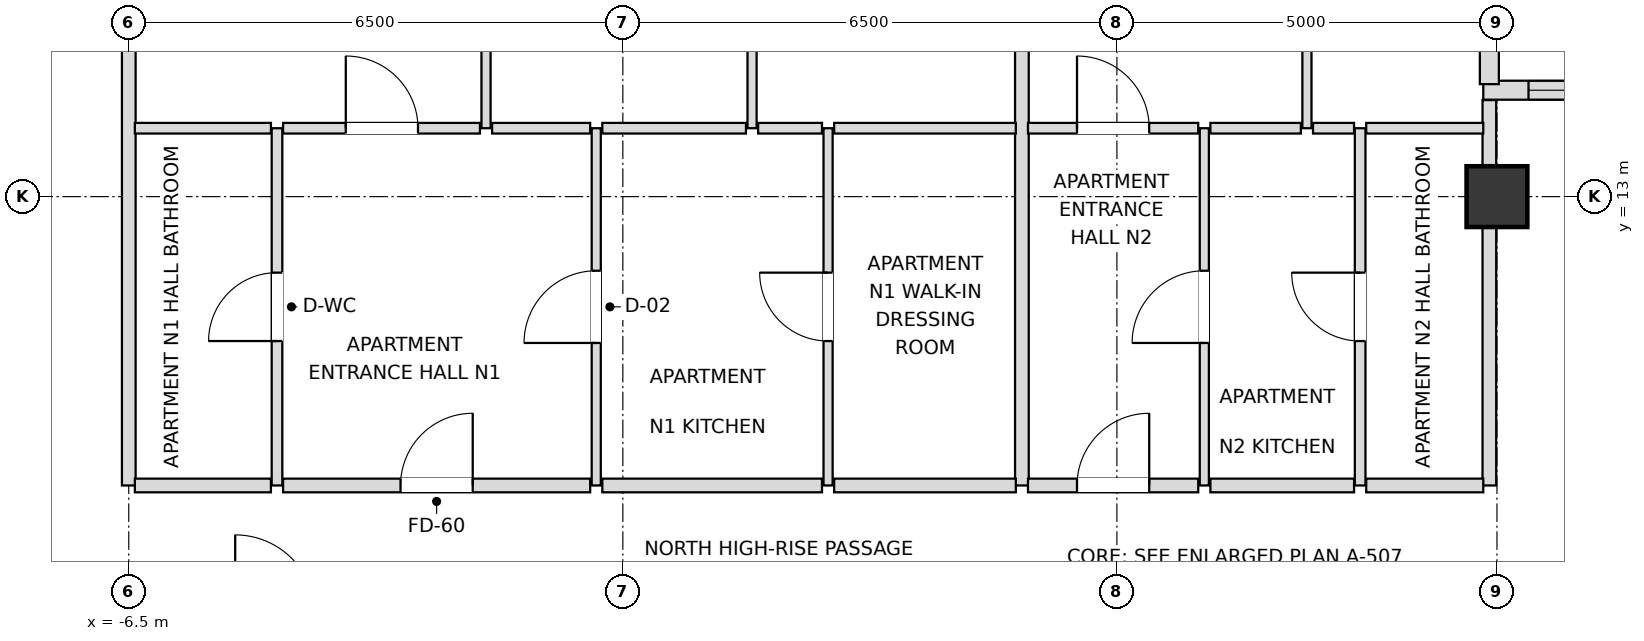
"""IFC4 building model, lengths in metres.
Left out: names, types, materials, properties, quantities, classifications, styles, units other than length and angle.
Written with IfcOpenShell. Run it as: python <this file> out.ifc"""

import sys

from ifc_helpers import new_model, si_unit, direction, frame, frame_2d, origin, origin_2d, place, context, subcontext, project, spatial, rectangle, extrude, element, fill, save


model = new_model("IFC4")
c1 = context("Model", 3, precision=1e-05, world=origin(), true_north=direction((0.0, 1.0)))
c2 = subcontext(c1, "Body", "Model", "MODEL_VIEW")
j1 = project(units=[si_unit("LENGTHUNIT", "METRE"), si_unit("PLANEANGLEUNIT", "RADIAN")], contexts=[c1])
p1 = place(None, origin())
s1 = spatial("IfcSite", under=j1, at=p1, CompositionType="ELEMENT")
p2 = place(p1, origin())
s2 = spatial("IfcBuilding", under=s1, at=p2, CompositionType="ELEMENT")
p3 = place(p2, frame((0.0, 0.0, 225.9)))
s3 = spatial("IfcBuildingStorey", under=s2, at=p3, CompositionType="ELEMENT", Elevation=225.9)
p4 = place(p3, frame((11.5, 13.0, 0.0), z_axis=(0.0, 0.0, 1.0), x_axis=(1.0, 0.0, 0.0)))
e1 = element("IfcColumn", 1, at=p4, inside=s3, PredefinedType="COLUMN", context=c2, shape_type="SweptSolid", body=[
    extrude(rectangle(XDim=0.8, YDim=0.8, at=origin_2d()), origin(), (0.0, 0.0, 1.0), 3.6),
])
p5 = place(p3, frame((16.98, 14.4, 0.0), z_axis=(0.0, 0.0, 1.0), x_axis=(-1.0, 0.0, 0.0)))
e2 = element("IfcWall", 2, at=p5, inside=s3, PredefinedType="SOLIDWALL", context=c2, shape_type="SweptSolid", body=[
    extrude(rectangle(XDim=5.66, YDim=0.25, at=frame_2d((2.83, 0.0))), origin(), (0.0, 0.0, 1.0), 2.748),
])
p6 = place(p5, frame((0.595, 0.0, 0.72)))
e3 = element("IfcOpeningElement", 3, at=p6, cuts=e2, PredefinedType="OPENING", context=c2, shape_type="SweptSolid", body=[
    extrude(rectangle(XDim=1.8, YDim=1.68, at=frame_2d((0.9, 0.84))), frame((0.0, 0.135, 0.0), z_axis=(0.0, -1.0, 0.0), x_axis=(1.0, 0.0, 0.0)), (0.0, 0.0, 1.0), 0.27),
])
p7 = place(p5, frame((3.265, 0.0, 0.72)))
e4 = element("IfcOpeningElement", 4, at=p7, cuts=e2, PredefinedType="OPENING", context=c2, shape_type="SweptSolid", body=[
    extrude(rectangle(XDim=1.8, YDim=1.68, at=frame_2d((0.9, 0.84))), frame((0.0, 0.135, 0.0), z_axis=(0.0, -1.0, 0.0), x_axis=(1.0, 0.0, 0.0)), (0.0, 0.0, 1.0), 0.27),
])
p8 = place(p3, frame((11.4, 14.48, 0.0), z_axis=(0.0, 0.0, 1.0), x_axis=(0.0, 1.0, 0.0)))
e5 = element("IfcWall", 5, at=p8, inside=s3, PredefinedType="SOLIDWALL", context=c2, shape_type="SweptSolid", body=[
    extrude(rectangle(XDim=5.34, YDim=0.25, at=frame_2d((2.67, 0.0))), origin(), (0.0, 0.0, 1.0), 2.748),
])
p9 = place(p8, frame((1.615, 0.0, 0.72)))
e6 = element("IfcOpeningElement", 6, at=p9, cuts=e5, PredefinedType="OPENING", context=c2, shape_type="SweptSolid", body=[
    extrude(rectangle(XDim=1.8, YDim=1.68, at=frame_2d((0.9, 0.84))), frame((0.0, 0.135, 0.0), z_axis=(0.0, -1.0, 0.0), x_axis=(1.0, 0.0, 0.0)), (0.0, 0.0, 1.0), 0.27),
])
p10 = place(p3, frame((-6.5, 9.2, 0.0), z_axis=(0.0, 0.0, 1.0), x_axis=(0.0, 1.0, 0.0)))
e7 = element("IfcWall", 7, at=p10, inside=s3, PredefinedType="PARTITIONING", context=c2, shape_type="SweptSolid", body=[
    extrude(rectangle(XDim=10.7, YDim=0.18, at=frame_2d((5.35, 0.0))), origin(), (0.0, 0.0, 1.0), 2.826),
])
p11 = place(p3, frame((-4.55, 9.2, 0.0), z_axis=(0.0, 0.0, 1.0), x_axis=(0.0, 1.0, 0.0)))
e8 = element("IfcWall", 8, at=p11, inside=s3, PredefinedType="PARTITIONING", context=c2, shape_type="SweptSolid", body=[
    extrude(rectangle(XDim=4.7, YDim=0.14, at=frame_2d((2.35, 0.0))), origin(), (0.0, 0.0, 1.0), 3.38),
])
p12 = place(p11, frame((1.9, 0.0, 0.0)))
e9 = element("IfcOpeningElement", 9, at=p12, cuts=e8, PredefinedType="OPENING", context=c2, shape_type="SweptSolid", body=[
    extrude(rectangle(XDim=0.9, YDim=2.1, at=frame_2d((0.45, 1.05))), frame((0.0, 0.08, 0.0), z_axis=(0.0, -1.0, 0.0), x_axis=(1.0, 0.0, 0.0)), (0.0, 0.0, 1.0), 0.16),
])
p13 = place(p3, frame((-1.8, 13.9, 0.0), z_axis=(0.0, 0.0, 1.0), x_axis=(0.0, 1.0, 0.0)))
e10 = element("IfcWall", 10, at=p13, inside=s3, PredefinedType="PARTITIONING", context=c2, shape_type="SweptSolid", body=[
    extrude(rectangle(XDim=6.0, YDim=0.12, at=frame_2d((3.0, 0.0))), origin(), (0.0, 0.0, 1.0), 3.018),
])
p14 = place(p13, frame((2.55, 0.0, 0.0)))
e11 = element("IfcOpeningElement", 11, at=p14, cuts=e10, PredefinedType="OPENING", context=c2, shape_type="SweptSolid", body=[
    extrude(rectangle(XDim=0.9, YDim=2.1, at=frame_2d((0.45, 1.05))), frame((0.0, 0.07, 0.0), z_axis=(0.0, -1.0, 0.0), x_axis=(1.0, 0.0, 0.0)), (0.0, 0.0, 1.0), 0.14),
])
p15 = place(p3, frame((-0.35, 9.2, 0.0), z_axis=(0.0, 0.0, 1.0), x_axis=(0.0, 1.0, 0.0)))
e12 = element("IfcWall", 12, at=p15, inside=s3, PredefinedType="PARTITIONING", context=c2, shape_type="SweptSolid", body=[
    extrude(rectangle(XDim=4.7, YDim=0.12, at=frame_2d((2.35, 0.0))), origin(), (0.0, 0.0, 1.0), 3.38),
])
p16 = place(p15, frame((1.875, 0.0, 0.0)))
e13 = element("IfcOpeningElement", 13, at=p16, cuts=e12, PredefinedType="OPENING", context=c2, shape_type="SweptSolid", body=[
    extrude(rectangle(XDim=0.95, YDim=2.1, at=frame_2d((0.475, 1.05))), frame((0.0, 0.07, 0.0), z_axis=(0.0, -1.0, 0.0), x_axis=(1.0, 0.0, 0.0)), (0.0, 0.0, 1.0), 0.14),
])
p17 = place(p3, frame((1.7, 13.9, 0.0), z_axis=(0.0, 0.0, 1.0), x_axis=(0.0, 1.0, 0.0)))
e14 = element("IfcWall", 14, at=p17, inside=s3, PredefinedType="PARTITIONING", context=c2, shape_type="SweptSolid", body=[
    extrude(rectangle(XDim=6.0, YDim=0.12, at=frame_2d((3.0, 0.0))), origin(), (0.0, 0.0, 1.0), 3.018),
])
p18 = place(p17, frame((2.55, 0.0, 0.0)))
e15 = element("IfcOpeningElement", 15, at=p18, cuts=e14, PredefinedType="OPENING", context=c2, shape_type="SweptSolid", body=[
    extrude(rectangle(XDim=0.9, YDim=2.1, at=frame_2d((0.45, 1.05))), frame((0.0, 0.07, 0.0), z_axis=(0.0, -1.0, 0.0), x_axis=(1.0, 0.0, 0.0)), (0.0, 0.0, 1.0), 0.14),
])
p19 = place(p3, frame((2.7, 9.2, 0.0), z_axis=(0.0, 0.0, 1.0), x_axis=(0.0, 1.0, 0.0)))
e16 = element("IfcWall", 16, at=p19, inside=s3, PredefinedType="PARTITIONING", context=c2, shape_type="SweptSolid", body=[
    extrude(rectangle(XDim=4.7, YDim=0.12, at=frame_2d((2.35, 0.0))), origin(), (0.0, 0.0, 1.0), 3.38),
])
p20 = place(p19, frame((1.9, 0.0, 0.0)))
e17 = element("IfcOpeningElement", 17, at=p20, cuts=e16, PredefinedType="OPENING", context=c2, shape_type="SweptSolid", body=[
    extrude(rectangle(XDim=0.9, YDim=2.1, at=frame_2d((0.45, 1.05))), frame((0.0, 0.07, 0.0), z_axis=(0.0, -1.0, 0.0), x_axis=(1.0, 0.0, 0.0)), (0.0, 0.0, 1.0), 0.14),
])
p21 = place(p3, frame((5.25, 9.2, 0.0), z_axis=(0.0, 0.0, 1.0), x_axis=(0.0, 1.0, 0.0)))
e18 = element("IfcWall", 18, at=p21, inside=s3, PredefinedType="PARTITIONING", context=c2, shape_type="SweptSolid", body=[
    extrude(rectangle(XDim=10.7, YDim=0.18, at=frame_2d((5.35, 0.0))), origin(), (0.0, 0.0, 1.0), 3.018),
])
p22 = place(p3, frame((7.65, 9.2, 0.0), z_axis=(0.0, 0.0, 1.0), x_axis=(0.0, 1.0, 0.0)))
e19 = element("IfcWall", 19, at=p22, inside=s3, PredefinedType="PARTITIONING", context=c2, shape_type="SweptSolid", body=[
    extrude(rectangle(XDim=4.7, YDim=0.12, at=frame_2d((2.35, 0.0))), origin(), (0.0, 0.0, 1.0), 2.826),
])
p23 = place(p22, frame((1.875, 0.0, 0.0)))
e20 = element("IfcOpeningElement", 20, at=p23, cuts=e19, PredefinedType="OPENING", context=c2, shape_type="SweptSolid", body=[
    extrude(rectangle(XDim=0.95, YDim=2.1, at=frame_2d((0.475, 1.05))), frame((0.0, 0.07, 0.0), z_axis=(0.0, -1.0, 0.0), x_axis=(1.0, 0.0, 0.0)), (0.0, 0.0, 1.0), 0.14),
])
p24 = place(p3, frame((9.0, 13.9, 0.0), z_axis=(0.0, 0.0, 1.0), x_axis=(0.0, 1.0, 0.0)))
e21 = element("IfcWall", 21, at=p24, inside=s3, PredefinedType="PARTITIONING", context=c2, shape_type="SweptSolid", body=[
    extrude(rectangle(XDim=6.0, YDim=0.12, at=frame_2d((3.0, 0.0))), origin(), (0.0, 0.0, 1.0), 3.38),
])
p25 = place(p24, frame((2.55, 0.0, 0.0)))
e22 = element("IfcOpeningElement", 22, at=p25, cuts=e21, PredefinedType="OPENING", context=c2, shape_type="SweptSolid", body=[
    extrude(rectangle(XDim=0.9, YDim=2.1, at=frame_2d((0.45, 1.05))), frame((0.0, 0.07, 0.0), z_axis=(0.0, -1.0, 0.0), x_axis=(1.0, 0.0, 0.0)), (0.0, 0.0, 1.0), 0.14),
])
p26 = place(p3, frame((9.7, 9.2, 0.0), z_axis=(0.0, 0.0, 1.0), x_axis=(0.0, 1.0, 0.0)))
e23 = element("IfcWall", 23, at=p26, inside=s3, PredefinedType="PARTITIONING", context=c2, shape_type="SweptSolid", body=[
    extrude(rectangle(XDim=4.7, YDim=0.14, at=frame_2d((2.35, 0.0))), origin(), (0.0, 0.0, 1.0), 2.826),
])
p27 = place(p26, frame((1.9, 0.0, 0.0)))
e24 = element("IfcOpeningElement", 24, at=p27, cuts=e23, PredefinedType="OPENING", context=c2, shape_type="SweptSolid", body=[
    extrude(rectangle(XDim=0.9, YDim=2.1, at=frame_2d((0.45, 1.05))), frame((0.0, 0.08, 0.0), z_axis=(0.0, -1.0, 0.0), x_axis=(1.0, 0.0, 0.0)), (0.0, 0.0, 1.0), 0.16),
])
p28 = place(p3, frame((11.4, 9.2, 0.0), z_axis=(0.0, 0.0, 1.0), x_axis=(0.0, 1.0, 0.0)))
e25 = element("IfcWall", 25, at=p28, inside=s3, PredefinedType="PARTITIONING", context=c2, shape_type="SweptSolid", body=[
    extrude(rectangle(XDim=5.07, YDim=0.18, at=frame_2d((2.535, 0.0))), origin(), (0.0, 0.0, 1.0), 2.748),
])
p29 = place(p3, frame((-6.42, 9.2, 0.0), z_axis=(0.0, 0.0, 1.0), x_axis=(1.0, 0.0, 0.0)))
e26 = element("IfcWall", 26, at=p29, inside=s3, PredefinedType="PARTITIONING", context=c2, shape_type="SweptSolid", body=[
    extrude(rectangle(XDim=1.79, YDim=0.18, at=frame_2d((0.895, 0.0))), origin(), (0.0, 0.0, 1.0), 3.38),
])
p30 = place(p3, frame((-4.47, 9.2, 0.0), z_axis=(0.0, 0.0, 1.0), x_axis=(1.0, 0.0, 0.0)))
e27 = element("IfcWall", 27, at=p30, inside=s3, PredefinedType="PARTITIONING", context=c2, shape_type="SweptSolid", body=[
    extrude(rectangle(XDim=4.04, YDim=0.18, at=frame_2d((2.02, 0.0))), origin(), (0.0, 0.0, 1.0), 3.38),
])
p31 = place(p30, frame((1.545, 0.0, 0.0)))
e28 = element("IfcOpeningElement", 28, at=p31, cuts=e27, PredefinedType="OPENING", context=c2, shape_type="SweptSolid", body=[
    extrude(rectangle(XDim=0.95, YDim=2.15, at=frame_2d((0.475, 1.075))), frame((0.0, 0.1, 0.0), z_axis=(0.0, -1.0, 0.0), x_axis=(1.0, 0.0, 0.0)), (0.0, 0.0, 1.0), 0.2),
])
p32 = place(p3, frame((-0.27, 9.2, 0.0), z_axis=(0.0, 0.0, 1.0), x_axis=(1.0, 0.0, 0.0)))
e29 = element("IfcWall", 29, at=p32, inside=s3, PredefinedType="PARTITIONING", context=c2, shape_type="SweptSolid", body=[
    extrude(rectangle(XDim=2.89, YDim=0.18, at=frame_2d((1.445, 0.0))), origin(), (0.0, 0.0, 1.0), 3.38),
])
p33 = place(p3, frame((2.78, 9.2, 0.0), z_axis=(0.0, 0.0, 1.0), x_axis=(1.0, 0.0, 0.0)))
e30 = element("IfcWall", 30, at=p33, inside=s3, PredefinedType="PARTITIONING", context=c2, shape_type="SweptSolid", body=[
    extrude(rectangle(XDim=2.39, YDim=0.18, at=frame_2d((1.195, 0.0))), origin(), (0.0, 0.0, 1.0), 3.38),
])
p34 = place(p3, frame((5.33, 9.2, 0.0), z_axis=(0.0, 0.0, 1.0), x_axis=(1.0, 0.0, 0.0)))
e31 = element("IfcWall", 31, at=p34, inside=s3, PredefinedType="PARTITIONING", context=c2, shape_type="SweptSolid", body=[
    extrude(rectangle(XDim=2.24, YDim=0.18, at=frame_2d((1.12, 0.0))), origin(), (0.0, 0.0, 1.0), 2.826),
])
p35 = place(p34, frame((0.645, 0.0, 0.0)))
e32 = element("IfcOpeningElement", 32, at=p35, cuts=e31, PredefinedType="OPENING", context=c2, shape_type="SweptSolid", body=[
    extrude(rectangle(XDim=0.95, YDim=2.15, at=frame_2d((0.475, 1.075))), frame((0.0, 0.1, 0.0), z_axis=(0.0, -1.0, 0.0), x_axis=(1.0, 0.0, 0.0)), (0.0, 0.0, 1.0), 0.2),
])
p36 = place(p3, frame((7.73, 9.2, 0.0), z_axis=(0.0, 0.0, 1.0), x_axis=(1.0, 0.0, 0.0)))
e33 = element("IfcWall", 33, at=p36, inside=s3, PredefinedType="PARTITIONING", context=c2, shape_type="SweptSolid", body=[
    extrude(rectangle(XDim=1.89, YDim=0.18, at=frame_2d((0.945, 0.0))), origin(), (0.0, 0.0, 1.0), 3.38),
])
p37 = place(p3, frame((9.78, 9.2, 0.0), z_axis=(0.0, 0.0, 1.0), x_axis=(1.0, 0.0, 0.0)))
e34 = element("IfcWall", 34, at=p37, inside=s3, PredefinedType="PARTITIONING", context=c2, shape_type="SweptSolid", body=[
    extrude(rectangle(XDim=1.54, YDim=0.18, at=frame_2d((0.77, 0.0))), origin(), (0.0, 0.0, 1.0), 3.38),
])
p38 = place(p3, frame((-6.42, 13.9, 0.0), z_axis=(0.0, 0.0, 1.0), x_axis=(1.0, 0.0, 0.0)))
e35 = element("IfcWall", 35, at=p38, inside=s3, PredefinedType="PARTITIONING", context=c2, shape_type="SweptSolid", body=[
    extrude(rectangle(XDim=1.79, YDim=0.14, at=frame_2d((0.895, 0.0))), origin(), (0.0, 0.0, 1.0), 3.38),
])
p39 = place(p3, frame((-4.47, 13.9, 0.0), z_axis=(0.0, 0.0, 1.0), x_axis=(1.0, 0.0, 0.0)))
e36 = element("IfcWall", 36, at=p39, inside=s3, PredefinedType="PARTITIONING", context=c2, shape_type="SweptSolid", body=[
    extrude(rectangle(XDim=2.59, YDim=0.14, at=frame_2d((1.295, 0.0))), origin(), (0.0, 0.0, 1.0), 3.38),
])
p40 = place(p39, frame((0.825, 0.0, 0.0)))
e37 = element("IfcOpeningElement", 37, at=p40, cuts=e36, PredefinedType="OPENING", context=c2, shape_type="SweptSolid", body=[
    extrude(rectangle(XDim=0.95, YDim=2.1, at=frame_2d((0.475, 1.05))), frame((0.0, 0.08, 0.0), z_axis=(0.0, -1.0, 0.0), x_axis=(1.0, 0.0, 0.0)), (0.0, 0.0, 1.0), 0.16),
])
p41 = place(p3, frame((-1.72, 13.9, 0.0), z_axis=(0.0, 0.0, 1.0), x_axis=(1.0, 0.0, 0.0)))
e38 = element("IfcWall", 38, at=p41, inside=s3, PredefinedType="PARTITIONING", context=c2, shape_type="SweptSolid", body=[
    extrude(rectangle(XDim=1.29, YDim=0.14, at=frame_2d((0.645, 0.0))), origin(), (0.0, 0.0, 1.0), 3.38),
])
p42 = place(p3, frame((-0.27, 13.9, 0.0), z_axis=(0.0, 0.0, 1.0), x_axis=(1.0, 0.0, 0.0)))
e39 = element("IfcWall", 39, at=p42, inside=s3, PredefinedType="PARTITIONING", context=c2, shape_type="SweptSolid", body=[
    extrude(rectangle(XDim=1.89, YDim=0.14, at=frame_2d((0.945, 0.0))), origin(), (0.0, 0.0, 1.0), 3.38),
])
p43 = place(p3, frame((1.78, 13.9, 0.0), z_axis=(0.0, 0.0, 1.0), x_axis=(1.0, 0.0, 0.0)))
e40 = element("IfcWall", 40, at=p43, inside=s3, PredefinedType="PARTITIONING", context=c2, shape_type="SweptSolid", body=[
    extrude(rectangle(XDim=0.84, YDim=0.14, at=frame_2d((0.42, 0.0))), origin(), (0.0, 0.0, 1.0), 3.38),
])
p44 = place(p3, frame((2.78, 13.9, 0.0), z_axis=(0.0, 0.0, 1.0), x_axis=(1.0, 0.0, 0.0)))
e41 = element("IfcWall", 41, at=p44, inside=s3, PredefinedType="PARTITIONING", context=c2, shape_type="SweptSolid", body=[
    extrude(rectangle(XDim=2.39, YDim=0.14, at=frame_2d((1.195, 0.0))), origin(), (0.0, 0.0, 1.0), 3.38),
])
p45 = place(p3, frame((5.33, 13.9, 0.0), z_axis=(0.0, 0.0, 1.0), x_axis=(1.0, 0.0, 0.0)))
e42 = element("IfcWall", 42, at=p45, inside=s3, PredefinedType="PARTITIONING", context=c2, shape_type="SweptSolid", body=[
    extrude(rectangle(XDim=2.24, YDim=0.14, at=frame_2d((1.12, 0.0))), origin(), (0.0, 0.0, 1.0), 2.826),
])
p46 = place(p45, frame((0.645, 0.0, 0.0)))
e43 = element("IfcOpeningElement", 43, at=p46, cuts=e42, PredefinedType="OPENING", context=c2, shape_type="SweptSolid", body=[
    extrude(rectangle(XDim=0.95, YDim=2.1, at=frame_2d((0.475, 1.05))), frame((0.0, 0.08, 0.0), z_axis=(0.0, -1.0, 0.0), x_axis=(1.0, 0.0, 0.0)), (0.0, 0.0, 1.0), 0.16),
])
p47 = place(p3, frame((7.73, 13.9, 0.0), z_axis=(0.0, 0.0, 1.0), x_axis=(1.0, 0.0, 0.0)))
e44 = element("IfcWall", 44, at=p47, inside=s3, PredefinedType="PARTITIONING", context=c2, shape_type="SweptSolid", body=[
    extrude(rectangle(XDim=1.19, YDim=0.14, at=frame_2d((0.595, 0.0))), origin(), (0.0, 0.0, 1.0), 3.38),
])
p48 = place(p3, frame((9.08, 13.9, 0.0), z_axis=(0.0, 0.0, 1.0), x_axis=(1.0, 0.0, 0.0)))
e45 = element("IfcWall", 45, at=p48, inside=s3, PredefinedType="PARTITIONING", context=c2, shape_type="SweptSolid", body=[
    extrude(rectangle(XDim=0.54, YDim=0.14, at=frame_2d((0.27, 0.0))), origin(), (0.0, 0.0, 1.0), 3.38),
])
p49 = place(p3, frame((9.78, 13.9, 0.0), z_axis=(0.0, 0.0, 1.0), x_axis=(1.0, 0.0, 0.0)))
e46 = element("IfcWall", 46, at=p49, inside=s3, PredefinedType="PARTITIONING", context=c2, shape_type="SweptSolid", body=[
    extrude(rectangle(XDim=1.54, YDim=0.14, at=frame_2d((0.77, 0.0))), origin(), (0.0, 0.0, 1.0), 3.38),
])
p50 = place(p7, origin())
e47 = element("IfcWindow", 47, at=p50, inside=s3, PartitioningType="SINGLE_PANEL", PredefinedType="WINDOW", context=c2, shape_type="SweptSolid", body=[
    extrude(rectangle(XDim=1.8, YDim=1.68, at=frame_2d((0.9, 0.84))), frame((0.0, 0.03, 0.0), z_axis=(0.0, -1.0, 0.0), x_axis=(1.0, 0.0, 0.0)), (0.0, 0.0, 1.0), 0.06),
])
fill(e4, e47)
p51 = place(p12, origin())
e48 = element("IfcDoor", 48, at=p51, inside=s3, OperationType="SINGLE_SWING_LEFT", PredefinedType="DOOR", context=c2, shape_type="SweptSolid", body=[
    extrude(rectangle(XDim=0.9, YDim=2.1, at=frame_2d((0.45, 1.05))), frame((0.0, 0.025, 0.0), z_axis=(0.0, -1.0, 0.0), x_axis=(1.0, 0.0, 0.0)), (0.0, 0.0, 1.0), 0.05),
])
fill(e9, e48)
p52 = place(p31, origin())
e49 = element("IfcDoor", 49, at=p52, inside=s3, OperationType="SINGLE_SWING_RIGHT", PredefinedType="DOOR", context=c2, shape_type="SweptSolid", body=[
    extrude(rectangle(XDim=0.95, YDim=2.15, at=frame_2d((0.475, 1.075))), frame((0.0, 0.025, 0.0), z_axis=(0.0, -1.0, 0.0), x_axis=(1.0, 0.0, 0.0)), (0.0, 0.0, 1.0), 0.05),
])
fill(e28, e49)
p53 = place(p16, origin())
e50 = element("IfcDoor", 50, at=p53, inside=s3, OperationType="SINGLE_SWING_LEFT", PredefinedType="DOOR", context=c2, shape_type="SweptSolid", body=[
    extrude(rectangle(XDim=0.95, YDim=2.1, at=frame_2d((0.475, 1.05))), frame((0.0, 0.025, 0.0), z_axis=(0.0, -1.0, 0.0), x_axis=(1.0, 0.0, 0.0)), (0.0, 0.0, 1.0), 0.05),
])
fill(e13, e50)
p54 = place(p20, origin())
e51 = element("IfcDoor", 51, at=p54, inside=s3, OperationType="SINGLE_SWING_RIGHT", PredefinedType="DOOR", context=c2, shape_type="SweptSolid", body=[
    extrude(rectangle(XDim=0.9, YDim=2.1, at=frame_2d((0.45, 1.05))), frame((0.0, 0.025, 0.0), z_axis=(0.0, -1.0, 0.0), x_axis=(1.0, 0.0, 0.0)), (0.0, 0.0, 1.0), 0.05),
])
fill(e17, e51)
p55 = place(p40, origin())
e52 = element("IfcDoor", 52, at=p55, inside=s3, OperationType="SINGLE_SWING_LEFT", PredefinedType="DOOR", context=c2, shape_type="SweptSolid", body=[
    extrude(rectangle(XDim=0.95, YDim=2.1, at=frame_2d((0.475, 1.05))), frame((0.0, 0.025, 0.0), z_axis=(0.0, -1.0, 0.0), x_axis=(1.0, 0.0, 0.0)), (0.0, 0.0, 1.0), 0.05),
])
fill(e37, e52)
p56 = place(p35, origin())
e53 = element("IfcDoor", 53, at=p56, inside=s3, OperationType="SINGLE_SWING_RIGHT", PredefinedType="DOOR", context=c2, shape_type="SweptSolid", body=[
    extrude(rectangle(XDim=0.95, YDim=2.15, at=frame_2d((0.475, 1.075))), frame((0.0, 0.025, 0.0), z_axis=(0.0, -1.0, 0.0), x_axis=(1.0, 0.0, 0.0)), (0.0, 0.0, 1.0), 0.05),
])
fill(e32, e53)
p57 = place(p23, origin())
e54 = element("IfcDoor", 54, at=p57, inside=s3, OperationType="SINGLE_SWING_LEFT", PredefinedType="DOOR", context=c2, shape_type="SweptSolid", body=[
    extrude(rectangle(XDim=0.95, YDim=2.1, at=frame_2d((0.475, 1.05))), frame((0.0, 0.025, 0.0), z_axis=(0.0, -1.0, 0.0), x_axis=(1.0, 0.0, 0.0)), (0.0, 0.0, 1.0), 0.05),
])
fill(e20, e54)
p58 = place(p27, origin())
e55 = element("IfcDoor", 55, at=p58, inside=s3, OperationType="SINGLE_SWING_RIGHT", PredefinedType="DOOR", context=c2, shape_type="SweptSolid", body=[
    extrude(rectangle(XDim=0.9, YDim=2.1, at=frame_2d((0.45, 1.05))), frame((0.0, 0.025, 0.0), z_axis=(0.0, -1.0, 0.0), x_axis=(1.0, 0.0, 0.0)), (0.0, 0.0, 1.0), 0.05),
])
fill(e24, e55)
p59 = place(p46, origin())
e56 = element("IfcDoor", 56, at=p59, inside=s3, OperationType="SINGLE_SWING_LEFT", PredefinedType="DOOR", context=c2, shape_type="SweptSolid", body=[
    extrude(rectangle(XDim=0.95, YDim=2.1, at=frame_2d((0.475, 1.05))), frame((0.0, 0.025, 0.0), z_axis=(0.0, -1.0, 0.0), x_axis=(1.0, 0.0, 0.0)), (0.0, 0.0, 1.0), 0.05),
])
fill(e43, e56)
save(model, sys.argv[1])
